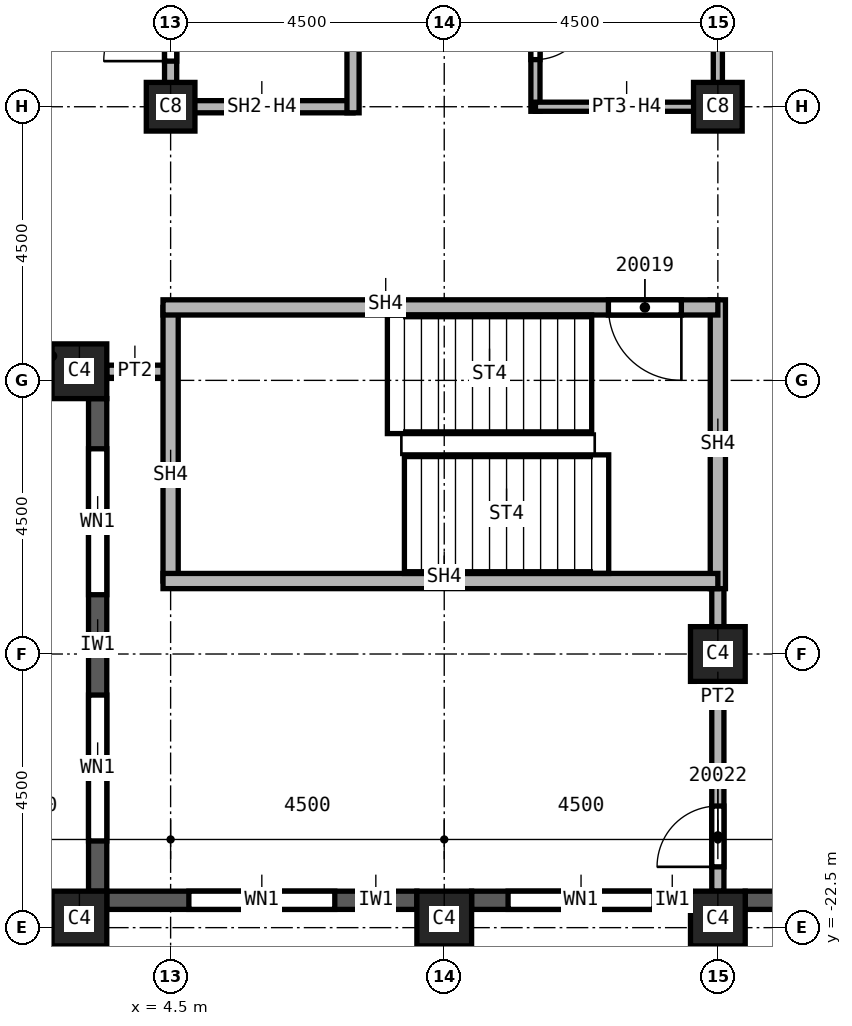
"""IFC4 building model, lengths in metres.
Left out: names, types, materials, properties, quantities, classifications, styles, units other than length and angle.
Written with IfcOpenShell. Run it as: python <this file> out.ifc"""

import sys

from ifc_helpers import new_model, si_unit, direction, frame, frame_2d, origin, origin_2d, place, context, subcontext, project, spatial, rectangle, extrude, element, fill, save


model = new_model("IFC4")
c1 = context("Model", 3, precision=1e-05, world=origin(), true_north=direction((0.0, 1.0)))
c2 = subcontext(c1, "Body", "Model", "MODEL_VIEW")
j1 = project(units=[si_unit("LENGTHUNIT", "METRE"), si_unit("PLANEANGLEUNIT", "RADIAN")], contexts=[c1])
p1 = place(None, origin())
s1 = spatial("IfcSite", under=j1, at=p1, CompositionType="ELEMENT")
p2 = place(p1, origin())
s2 = spatial("IfcBuilding", under=s1, at=p2, CompositionType="ELEMENT")
p3 = place(p2, frame((0.0, 0.0, 286.0)))
s3 = spatial("IfcBuildingStorey", under=s2, at=p3, CompositionType="ELEMENT", Elevation=286.0)
p4 = place(p3, frame((13.5, -18.0, 0.0), z_axis=(0.0, 0.0, 1.0), x_axis=(1.0, 0.0, 0.0)))
e1 = element("IfcColumn", 1, at=p4, inside=s3, PredefinedType="COLUMN", context=c2, shape_type="SweptSolid", body=[
    extrude(rectangle(XDim=0.9, YDim=0.9, at=origin_2d()), origin(), (0.0, 0.0, 1.0), 3.72),
])
for number, where, z_axis, x_axis in (
    (2, (4.5, -9.0, 0.0), (0.0, 0.0, 1.0), (1.0, 0.0, 0.0)),
    (3, (13.5, -9.0, 0.0), (0.0, 0.0, 1.0), (1.0, 0.0, 0.0)),
):
    element("IfcColumn", number, at=place(p3, frame(where, z_axis=z_axis, x_axis=x_axis)), inside=s3, PredefinedType="COLUMN", context=c2, shape_type="SweptSolid", body=[
        extrude(rectangle(XDim=0.8, YDim=0.8, at=origin_2d()), origin(), (0.0, 0.0, 1.0), 3.72),
    ])
for number, where, z_axis, x_axis in (
    (4, (3.0, -22.35, 0.0), (0.0, 0.0, 1.0), (1.0, 0.0, 0.0)),
    (5, (9.0, -22.35, 0.0), (0.0, 0.0, 1.0), (1.0, 0.0, 0.0)),
    (6, (13.5, -22.35, 0.0), (0.0, 0.0, 1.0), (1.0, 0.0, 0.0)),
    (7, (3.0, -13.35, 0.0), (0.0, 0.0, 1.0), (1.0, 0.0, 0.0)),
):
    element("IfcColumn", number, at=place(p3, frame(where, z_axis=z_axis, x_axis=x_axis)), inside=s3, PredefinedType="COLUMN", context=c2, shape_type="SweptSolid", body=[
        extrude(rectangle(XDim=0.9, YDim=0.9, at=origin_2d()), origin(), (0.0, 0.0, 1.0), 3.72),
    ])
p5 = place(p3, frame((3.3, -13.8, 0.0), z_axis=(0.0, 0.0, 1.0), x_axis=(0.0, -1.0, 0.0)))
e8 = element("IfcWall", 8, at=p5, inside=s3, PredefinedType="SOLIDWALL", context=c2, shape_type="SweptSolid", body=[
    extrude(rectangle(XDim=8.1, YDim=0.3, at=frame_2d((4.05, 0.0))), origin(), (0.0, 0.0, 1.0), 3.12),
])
p6 = place(p5, frame((0.825, 0.0, 0.8)))
e9 = element("IfcOpeningElement", 9, at=p6, cuts=e8, PredefinedType="OPENING", context=c2, shape_type="SweptSolid", body=[
    extrude(rectangle(XDim=2.4, YDim=1.95, at=frame_2d((1.2, 0.975))), frame((0.0, 0.15, 0.0), z_axis=(0.0, -1.0, 0.0), x_axis=(1.0, 0.0, 0.0)), (0.0, 0.0, 1.0), 0.3),
])
p7 = place(p5, frame((4.875, 0.0, 0.8)))
e10 = element("IfcOpeningElement", 10, at=p7, cuts=e8, PredefinedType="OPENING", context=c2, shape_type="SweptSolid", body=[
    extrude(rectangle(XDim=2.4, YDim=1.95, at=frame_2d((1.2, 0.975))), frame((0.0, 0.15, 0.0), z_axis=(0.0, -1.0, 0.0), x_axis=(1.0, 0.0, 0.0)), (0.0, 0.0, 1.0), 0.3),
])
p8 = place(p3, frame((3.45, -22.05, 0.0), z_axis=(0.0, 0.0, 1.0), x_axis=(1.0, 0.0, 0.0)))
e11 = element("IfcWall", 11, at=p8, inside=s3, PredefinedType="SOLIDWALL", context=c2, shape_type="SweptSolid", body=[
    extrude(rectangle(XDim=5.1, YDim=0.3, at=frame_2d((2.55, 0.0))), origin(), (0.0, 0.0, 1.0), 3.12),
])
p9 = place(p8, frame((1.35, 0.0, 0.8)))
e12 = element("IfcOpeningElement", 12, at=p9, cuts=e11, PredefinedType="OPENING", context=c2, shape_type="SweptSolid", body=[
    extrude(rectangle(XDim=2.4, YDim=1.95, at=frame_2d((1.2, 0.975))), frame((0.0, 0.15, 0.0), z_axis=(0.0, -1.0, 0.0), x_axis=(1.0, 0.0, 0.0)), (0.0, 0.0, 1.0), 0.3),
])
p10 = place(p3, frame((9.45, -22.05, 0.0), z_axis=(0.0, 0.0, 1.0), x_axis=(1.0, 0.0, 0.0)))
e13 = element("IfcWall", 13, at=p10, inside=s3, PredefinedType="SOLIDWALL", context=c2, shape_type="SweptSolid", body=[
    extrude(rectangle(XDim=3.6, YDim=0.3, at=frame_2d((1.8, 0.0))), origin(), (0.0, 0.0, 1.0), 3.12),
])
p11 = place(p10, frame((0.6, 0.0, 0.8)))
e14 = element("IfcOpeningElement", 14, at=p11, cuts=e13, PredefinedType="OPENING", context=c2, shape_type="SweptSolid", body=[
    extrude(rectangle(XDim=2.4, YDim=1.95, at=frame_2d((1.2, 0.975))), frame((0.0, 0.15, 0.0), z_axis=(0.0, -1.0, 0.0), x_axis=(1.0, 0.0, 0.0)), (0.0, 0.0, 1.0), 0.3),
])
p12 = place(p3, frame((13.95, -22.05, 0.0), z_axis=(0.0, 0.0, 1.0), x_axis=(1.0, 0.0, 0.0)))
e15 = element("IfcWall", 15, at=p12, inside=s3, PredefinedType="SOLIDWALL", context=c2, shape_type="SweptSolid", body=[
    extrude(rectangle(XDim=3.6, YDim=0.3, at=frame_2d((1.8, 0.0))), origin(), (0.0, 0.0, 1.0), 3.12),
])
p13 = place(p12, frame((0.625, 0.0, 0.8)))
e16 = element("IfcOpeningElement", 16, at=p13, cuts=e15, PredefinedType="OPENING", context=c2, shape_type="SweptSolid", body=[
    extrude(rectangle(XDim=0.6, YDim=1.95, at=frame_2d((0.3, 0.975))), frame((0.0, 0.15, 0.0), z_axis=(0.0, -1.0, 0.0), x_axis=(1.0, 0.0, 0.0)), (0.0, 0.0, 1.0), 0.3),
])
p14 = place(p12, frame((1.825, 0.0, 0.8)))
e17 = element("IfcOpeningElement", 17, at=p14, cuts=e15, PredefinedType="OPENING", context=c2, shape_type="SweptSolid", body=[
    extrude(rectangle(XDim=1.0, YDim=1.95, at=frame_2d((0.5, 0.975))), frame((0.0, 0.15, 0.0), z_axis=(0.0, -1.0, 0.0), x_axis=(1.0, 0.0, 0.0)), (0.0, 0.0, 1.0), 0.3),
])
p15 = place(p3, frame((4.5, -13.35, 0.0), z_axis=(0.0, 0.0, 1.0), x_axis=(-1.0, 0.0, 0.0)))
e18 = element("IfcWall", 18, at=p15, inside=s3, PredefinedType="PARTITIONING", context=c2, shape_type="SweptSolid", body=[
    extrude(rectangle(XDim=1.05, YDim=0.2, at=frame_2d((0.525, 0.0))), origin(), (0.0, 0.0, 1.0), 3.72),
])
p16 = place(p3, frame((13.5, -21.9, 0.0), z_axis=(0.0, 0.0, 1.0), x_axis=(0.0, 1.0, 0.0)))
e19 = element("IfcWall", 19, at=p16, inside=s3, PredefinedType="PARTITIONING", context=c2, shape_type="SweptSolid", body=[
    extrude(rectangle(XDim=5.225, YDim=0.2, at=frame_2d((2.612, 0.0))), origin(), (0.0, 0.0, 1.0), 3.72),
])
p17 = place(p16, frame((0.4, 0.0, 0.0)))
e20 = element("IfcOpeningElement", 20, at=p17, cuts=e19, PredefinedType="OPENING", context=c2, shape_type="SweptSolid", body=[
    extrude(rectangle(XDim=1.0, YDim=2.1, at=frame_2d((0.5, 1.05))), frame((0.0, 0.1, 0.0), z_axis=(0.0, -1.0, 0.0), x_axis=(1.0, 0.0, 0.0)), (0.0, 0.0, 1.0), 0.2),
])
p18 = place(p3, frame((4.5, -9.1, 0.0), z_axis=(0.0, 0.0, 1.0), x_axis=(0.0, 1.0, 0.0)))
e21 = element("IfcWall", 21, at=p18, inside=s3, PredefinedType="SOLIDWALL", context=c2, shape_type="SweptSolid", body=[
    extrude(rectangle(XDim=3.1, YDim=0.2, at=frame_2d((1.55, 0.0))), origin(), (0.0, 0.0, 1.0), 3.042),
])
p19 = place(p18, frame((0.85, 0.0, 0.0)))
e22 = element("IfcOpeningElement", 22, at=p19, cuts=e21, PredefinedType="OPENING", context=c2, shape_type="SweptSolid", body=[
    extrude(rectangle(XDim=1.1, YDim=2.1, at=frame_2d((0.55, 1.05))), frame((0.0, 0.1, 0.0), z_axis=(0.0, -1.0, 0.0), x_axis=(1.0, 0.0, 0.0)), (0.0, 0.0, 1.0), 0.2),
])
p20 = place(p3, frame((7.5, -9.0, 0.0), z_axis=(0.0, 0.0, 1.0), x_axis=(-1.0, 0.0, 0.0)))
e23 = element("IfcWall", 23, at=p20, inside=s3, PredefinedType="SOLIDWALL", context=c2, shape_type="SweptSolid", body=[
    extrude(rectangle(XDim=3.0, YDim=0.2, at=frame_2d((1.5, 0.0))), origin(), (0.0, 0.0, 1.0), 3.042),
])
p21 = place(p3, frame((7.5, -6.0, 0.0), z_axis=(0.0, 0.0, 1.0), x_axis=(0.0, -1.0, 0.0)))
e24 = element("IfcWall", 24, at=p21, inside=s3, PredefinedType="SOLIDWALL", context=c2, shape_type="SweptSolid", body=[
    extrude(rectangle(XDim=3.1, YDim=0.2, at=frame_2d((1.55, 0.0))), origin(), (0.0, 0.0, 1.0), 3.72),
])
p22 = place(p3, frame((4.5, -16.8, 0.0), z_axis=(0.0, 0.0, 1.0), x_axis=(0.0, 1.0, 0.0)))
e25 = element("IfcWall", 25, at=p22, inside=s3, PredefinedType="SOLIDWALL", context=c2, shape_type="SweptSolid", body=[
    extrude(rectangle(XDim=4.5, YDim=0.25, at=frame_2d((2.25, 0.0))), origin(), (0.0, 0.0, 1.0), 3.72),
])
p23 = place(p3, frame((13.5, -16.925, 0.0), z_axis=(0.0, 0.0, 1.0), x_axis=(0.0, 1.0, 0.0)))
e26 = element("IfcWall", 26, at=p23, inside=s3, PredefinedType="SOLIDWALL", context=c2, shape_type="SweptSolid", body=[
    extrude(rectangle(XDim=4.75, YDim=0.25, at=frame_2d((2.375, 0.0))), origin(), (0.0, 0.0, 1.0), 3.72),
])
p24 = place(p3, frame((13.5, -16.8, 0.0), z_axis=(0.0, 0.0, 1.0), x_axis=(-1.0, 0.0, 0.0)))
e27 = element("IfcWall", 27, at=p24, inside=s3, PredefinedType="SOLIDWALL", context=c2, shape_type="SweptSolid", body=[
    extrude(rectangle(XDim=9.125, YDim=0.25, at=frame_2d((4.562, 0.0))), origin(), (0.0, 0.0, 1.0), 3.72),
])
p25 = place(p3, frame((13.5, -12.3, 0.0), z_axis=(0.0, 0.0, 1.0), x_axis=(-1.0, 0.0, 0.0)))
e28 = element("IfcWall", 28, at=p25, inside=s3, PredefinedType="SOLIDWALL", context=c2, shape_type="SweptSolid", body=[
    extrude(rectangle(XDim=9.125, YDim=0.25, at=frame_2d((4.562, 0.0))), origin(), (0.0, 0.0, 1.0), 3.72),
])
p26 = place(p25, frame((0.6, 0.0, 0.0)))
e29 = element("IfcOpeningElement", 29, at=p26, cuts=e28, PredefinedType="OPENING", context=c2, shape_type="SweptSolid", body=[
    extrude(rectangle(XDim=1.2, YDim=2.1, at=frame_2d((0.6, 1.05))), frame((0.0, 0.125, 0.0), z_axis=(0.0, -1.0, 0.0), x_axis=(1.0, 0.0, 0.0)), (0.0, 0.0, 1.0), 0.25),
])
p27 = place(p3, frame((10.5, -2.875, 0.0), z_axis=(0.0, 0.0, 1.0), x_axis=(0.0, -1.0, 0.0)))
e30 = element("IfcWall", 30, at=p27, inside=s3, PredefinedType="PARTITIONING", context=c2, shape_type="SweptSolid", body=[
    extrude(rectangle(XDim=6.2, YDim=0.15, at=frame_2d((3.1, 0.0))), origin(), (0.0, 0.0, 1.0), 3.72),
])
p28 = place(p27, frame((4.45, 0.0, 0.0)))
e31 = element("IfcOpeningElement", 31, at=p28, cuts=e30, PredefinedType="OPENING", context=c2, shape_type="SweptSolid", body=[
    extrude(rectangle(XDim=0.9, YDim=2.1, at=frame_2d((0.45, 1.05))), frame((0.0, 0.075, 0.0), z_axis=(0.0, -1.0, 0.0), x_axis=(1.0, 0.0, 0.0)), (0.0, 0.0, 1.0), 0.15),
])
p29 = place(p3, frame((13.5, -9.0, 0.0), z_axis=(0.0, 0.0, 1.0), x_axis=(-1.0, 0.0, 0.0)))
e32 = element("IfcWall", 32, at=p29, inside=s3, PredefinedType="PARTITIONING", context=c2, shape_type="SweptSolid", body=[
    extrude(rectangle(XDim=3.0, YDim=0.15, at=frame_2d((1.5, 0.0))), origin(), (0.0, 0.0, 1.0), 3.042),
])
p30 = place(p3, frame((13.5, -3.0, 0.0), z_axis=(0.0, 0.0, 1.0), x_axis=(0.0, -1.0, 0.0)))
e33 = element("IfcWall", 33, at=p30, inside=s3, PredefinedType="PARTITIONING", context=c2, shape_type="SweptSolid", body=[
    extrude(rectangle(XDim=6.075, YDim=0.15, at=frame_2d((3.038, 0.0))), origin(), (0.0, 0.0, 1.0), 3.042),
])
p31 = place(p6, origin())
e34 = element("IfcWindow", 34, at=p31, inside=s3, PartitioningType="SINGLE_PANEL", PredefinedType="WINDOW", context=c2, shape_type="SweptSolid", body=[
    extrude(rectangle(XDim=2.4, YDim=1.95, at=frame_2d((1.2, 0.975))), frame((0.0, 0.03, 0.0), z_axis=(0.0, -1.0, 0.0), x_axis=(1.0, 0.0, 0.0)), (0.0, 0.0, 1.0), 0.06),
])
fill(e9, e34)
p32 = place(p7, origin())
e35 = element("IfcWindow", 35, at=p32, inside=s3, PartitioningType="SINGLE_PANEL", PredefinedType="WINDOW", context=c2, shape_type="SweptSolid", body=[
    extrude(rectangle(XDim=2.4, YDim=1.95, at=frame_2d((1.2, 0.975))), frame((0.0, 0.03, 0.0), z_axis=(0.0, -1.0, 0.0), x_axis=(1.0, 0.0, 0.0)), (0.0, 0.0, 1.0), 0.06),
])
fill(e10, e35)
p33 = place(p9, origin())
e36 = element("IfcWindow", 36, at=p33, inside=s3, PartitioningType="SINGLE_PANEL", PredefinedType="WINDOW", context=c2, shape_type="SweptSolid", body=[
    extrude(rectangle(XDim=2.4, YDim=1.95, at=frame_2d((1.2, 0.975))), frame((0.0, 0.03, 0.0), z_axis=(0.0, -1.0, 0.0), x_axis=(1.0, 0.0, 0.0)), (0.0, 0.0, 1.0), 0.06),
])
fill(e12, e36)
p34 = place(p11, origin())
e37 = element("IfcWindow", 37, at=p34, inside=s3, PartitioningType="SINGLE_PANEL", PredefinedType="WINDOW", context=c2, shape_type="SweptSolid", body=[
    extrude(rectangle(XDim=2.4, YDim=1.95, at=frame_2d((1.2, 0.975))), frame((0.0, 0.03, 0.0), z_axis=(0.0, -1.0, 0.0), x_axis=(1.0, 0.0, 0.0)), (0.0, 0.0, 1.0), 0.06),
])
fill(e14, e37)
p35 = place(p19, origin())
e38 = element("IfcDoor", 38, at=p35, inside=s3, OperationType="SINGLE_SWING_RIGHT", PredefinedType="DOOR", context=c2, shape_type="SweptSolid", body=[
    extrude(rectangle(XDim=1.1, YDim=2.1, at=frame_2d((0.55, 1.05))), frame((0.0, 0.025, 0.0), z_axis=(0.0, -1.0, 0.0), x_axis=(1.0, 0.0, 0.0)), (0.0, 0.0, 1.0), 0.05),
])
fill(e22, e38)
p36 = place(p28, origin())
e39 = element("IfcDoor", 39, at=p36, inside=s3, OperationType="SINGLE_SWING_LEFT", PredefinedType="DOOR", context=c2, shape_type="SweptSolid", body=[
    extrude(rectangle(XDim=0.9, YDim=2.1, at=frame_2d((0.45, 1.05))), frame((0.0, 0.025, 0.0), z_axis=(0.0, -1.0, 0.0), x_axis=(1.0, 0.0, 0.0)), (0.0, 0.0, 1.0), 0.05),
])
fill(e31, e39)
p37 = place(p26, origin())
e40 = element("IfcDoor", 40, at=p37, inside=s3, OperationType="SINGLE_SWING_RIGHT", PredefinedType="DOOR", context=c2, shape_type="SweptSolid", body=[
    extrude(rectangle(XDim=1.2, YDim=2.1, at=frame_2d((0.6, 1.05))), frame((0.0, 0.025, 0.0), z_axis=(0.0, -1.0, 0.0), x_axis=(1.0, 0.0, 0.0)), (0.0, 0.0, 1.0), 0.05),
])
fill(e29, e40)
p38 = place(p17, origin())
e41 = element("IfcDoor", 41, at=p38, inside=s3, OperationType="SINGLE_SWING_LEFT", PredefinedType="DOOR", context=c2, shape_type="SweptSolid", body=[
    extrude(rectangle(XDim=1.0, YDim=2.1, at=frame_2d((0.5, 1.05))), frame((0.0, 0.025, 0.0), z_axis=(0.0, -1.0, 0.0), x_axis=(1.0, 0.0, 0.0)), (0.0, 0.0, 1.0), 0.05),
])
fill(e20, e41)
save(model, sys.argv[1])
